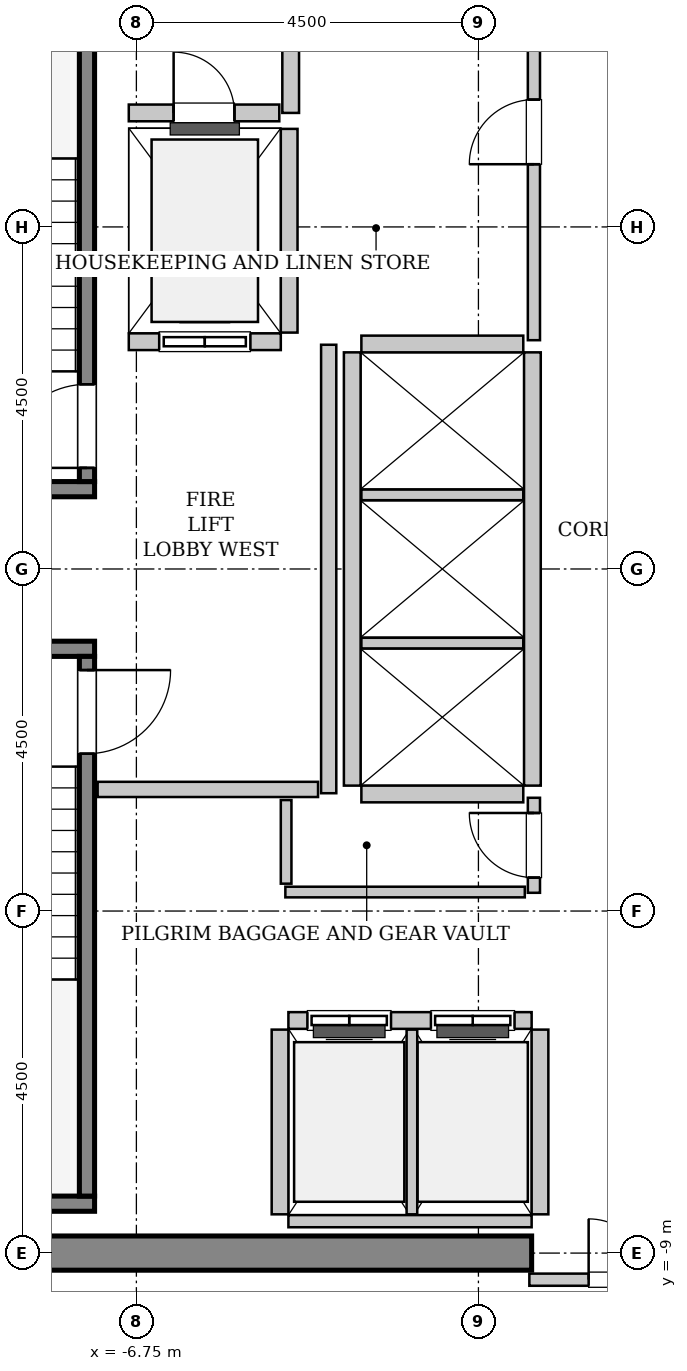
"""IFC4 building model, lengths in metres.
Left out: names, types, materials, properties, quantities, classifications, styles, units other than length and angle.
Written with IfcOpenShell. Run it as: python <this file> out.ifc"""

import sys

from ifc_helpers import new_model, si_unit, direction, frame, frame_2d, origin, place, context, subcontext, project, spatial, rectangle, extrude, source, transform, mapped, element, fill, save


model = new_model("IFC4")
c1 = context("Model", 3, precision=1e-05, world=origin(), true_north=direction((0.0, 1.0)))
c2 = subcontext(c1, "Body", "Model", "MODEL_VIEW")
j1 = project(units=[si_unit("LENGTHUNIT", "METRE"), si_unit("PLANEANGLEUNIT", "RADIAN")], contexts=[c1])
p1 = place(None, origin())
s1 = spatial("IfcSite", under=j1, at=p1, CompositionType="ELEMENT")
p2 = place(p1, origin())
s2 = spatial("IfcBuilding", under=s1, at=p2, CompositionType="ELEMENT")
p3 = place(p2, frame((0.0, 0.0, 244.6)))
s3 = spatial("IfcBuildingStorey", under=s2, at=p3, CompositionType="ELEMENT", Elevation=244.6)
m1 = source(origin(), c2, "Body", "SweptSolid", [
    extrude(rectangle(XDim=9.925, YDim=0.45, at=frame_2d((4.962, 0.0))), origin(), (0.0, 0.0, 1.0), 3.8),
])
p4 = place(p3, frame((-11.475, -9.0, 0.0), z_axis=(0.0, 0.0, 1.0), x_axis=(1.0, 0.0, 0.0)))
e1 = element("IfcWall", 1, at=p4, inside=s3, PredefinedType="SHEAR", context=c2, shape_type="MappedRepresentation", body=[
    mapped(m1, transform((0.0, 0.0, 0.0), x_axis=(1.0, 0.0, 0.0), y_axis=(0.0, 1.0, 0.0), z_axis=(0.0, 0.0, 1.0), scale=1.0)),
])
m2 = source(origin(), c2, "Body", "SweptSolid", [
    extrude(rectangle(XDim=3.4, YDim=0.2, at=frame_2d((1.7, 0.0))), origin(), (0.0, 0.0, 1.0), 3.8),
])
p5 = place(p3, frame((-7.3, 1.05, 0.0), z_axis=(0.0, 0.0, 1.0), x_axis=(-1.0, 0.0, 0.0)))
e2 = element("IfcWall", 2, at=p5, inside=s3, PredefinedType="SOLIDWALL", context=c2, shape_type="MappedRepresentation", body=[
    mapped(m2, transform((0.0, 0.0, 0.0), x_axis=(1.0, 0.0, 0.0), y_axis=(0.0, 1.0, 0.0), z_axis=(0.0, 0.0, 1.0), scale=1.0)),
])
m3 = source(origin(), c2, "Body", "SweptSolid", [
    extrude(rectangle(XDim=7.1, YDim=0.2, at=frame_2d((3.55, 0.0))), origin(), (0.0, 0.0, 1.0), 3.8),
])
p6 = place(p3, frame((-7.4, 1.15, 0.0), z_axis=(0.0, 0.0, 1.0), x_axis=(0.0, 1.0, 0.0)))
e3 = element("IfcWall", 3, at=p6, inside=s3, PredefinedType="SOLIDWALL", context=c2, shape_type="MappedRepresentation", body=[
    mapped(m3, transform((0.0, 0.0, 0.0), x_axis=(1.0, 0.0, 0.0), y_axis=(0.0, 1.0, 0.0), z_axis=(0.0, 0.0, 1.0), scale=1.0)),
])
p7 = place(p6, frame((0.18, 0.0, 0.0)))
e4 = element("IfcOpeningElement", 4, at=p7, cuts=e3, PredefinedType="OPENING", context=c2, shape_type="SweptSolid", body=[
    extrude(rectangle(XDim=1.1, YDim=2.15, at=frame_2d((0.55, 1.075))), frame((0.0, 0.11, 0.0), z_axis=(0.0, -1.0, 0.0), x_axis=(1.0, 0.0, 0.0)), (0.0, 0.0, 1.0), 0.22),
])
p8 = place(p3, frame((-10.7, -1.05, 0.0), z_axis=(0.0, 0.0, 1.0), x_axis=(1.0, 0.0, 0.0)))
e5 = element("IfcWall", 5, at=p8, inside=s3, PredefinedType="SOLIDWALL", context=c2, shape_type="MappedRepresentation", body=[
    mapped(m2, transform((0.0, 0.0, 0.0), x_axis=(1.0, 0.0, 0.0), y_axis=(0.0, 1.0, 0.0), z_axis=(0.0, 0.0, 1.0), scale=1.0)),
])
m4 = source(origin(), c2, "Body", "SweptSolid", [
    extrude(rectangle(XDim=3.73, YDim=0.2, at=frame_2d((1.865, 0.0))), origin(), (0.0, 0.0, 1.0), 3.8),
])
p9 = place(p3, frame((-11.03, -8.35, 0.0), z_axis=(0.0, 0.0, 1.0), x_axis=(1.0, 0.0, 0.0)))
e6 = element("IfcWall", 6, at=p9, inside=s3, PredefinedType="SOLIDWALL", context=c2, shape_type="MappedRepresentation", body=[
    mapped(m4, transform((0.0, 0.0, 0.0), x_axis=(1.0, 0.0, 0.0), y_axis=(0.0, 1.0, 0.0), z_axis=(0.0, 0.0, 1.0), scale=1.0)),
])
p10 = place(p3, frame((-7.4, -1.15, 0.0), z_axis=(0.0, 0.0, 1.0), x_axis=(0.0, -1.0, 0.0)))
e7 = element("IfcWall", 7, at=p10, inside=s3, PredefinedType="SOLIDWALL", context=c2, shape_type="MappedRepresentation", body=[
    mapped(m3, transform((0.0, 0.0, 0.0), x_axis=(1.0, 0.0, 0.0), y_axis=(0.0, 1.0, 0.0), z_axis=(0.0, 0.0, 1.0), scale=1.0)),
])
p11 = place(p10, frame((0.18, 0.0, 0.0)))
e8 = element("IfcOpeningElement", 8, at=p11, cuts=e7, PredefinedType="OPENING", context=c2, shape_type="SweptSolid", body=[
    extrude(rectangle(XDim=1.1, YDim=2.15, at=frame_2d((0.55, 1.075))), frame((0.0, 0.11, 0.0), z_axis=(0.0, -1.0, 0.0), x_axis=(1.0, 0.0, 0.0)), (0.0, 0.0, 1.0), 0.22),
])
m5 = source(origin(), c2, "Body", "SweptSolid", [
    extrude(rectangle(XDim=2.0, YDim=0.22, at=frame_2d((1.0, 0.0))), origin(), (0.0, 0.0, 1.0), 3.535),
])
p12 = place(p3, frame((-6.85, 2.99, 0.0), z_axis=(0.0, 0.0, 1.0), x_axis=(1.0, 0.0, 0.0)))
e9 = element("IfcWall", 9, at=p12, inside=s3, PredefinedType="SOLIDWALL", context=c2, shape_type="MappedRepresentation", body=[
    mapped(m5, transform((0.0, 0.0, 0.0), x_axis=(1.0, 0.0, 0.0), y_axis=(0.0, 1.0, 0.0), z_axis=(0.0, 0.0, 1.0), scale=1.0)),
])
p13 = place(p12, frame((0.4, 0.0, 0.0)))
e10 = element("IfcOpeningElement", 10, at=p13, cuts=e9, PredefinedType="OPENING", context=c2, shape_type="SweptSolid", body=[
    extrude(rectangle(XDim=1.2, YDim=2.2, at=frame_2d((0.6, 1.1))), frame((0.0, 0.12, 0.0), z_axis=(0.0, -1.0, 0.0), x_axis=(1.0, 0.0, 0.0)), (0.0, 0.0, 1.0), 0.24),
])
m6 = source(origin(), c2, "Body", "SweptSolid", [
    extrude(rectangle(XDim=2.68, YDim=0.22, at=frame_2d((1.34, 0.0))), origin(), (0.0, 0.0, 1.0), 3.535),
])
p14 = place(p3, frame((-4.74, 3.11, 0.0), z_axis=(0.0, 0.0, 1.0), x_axis=(0.0, 1.0, 0.0)))
e11 = element("IfcWall", 11, at=p14, inside=s3, PredefinedType="SOLIDWALL", context=c2, shape_type="MappedRepresentation", body=[
    mapped(m6, transform((0.0, 0.0, 0.0), x_axis=(1.0, 0.0, 0.0), y_axis=(0.0, 1.0, 0.0), z_axis=(0.0, 0.0, 1.0), scale=1.0)),
])
m7 = source(origin(), c2, "Body", "SweptSolid", [
    extrude(rectangle(XDim=3.2, YDim=0.22, at=frame_2d((1.6, 0.0))), origin(), (0.0, 0.0, 1.0), 3.535),
])
p15 = place(p3, frame((-1.55, -5.94, 0.0), z_axis=(0.0, 0.0, 1.0), x_axis=(-1.0, 0.0, 0.0)))
e12 = element("IfcWall", 12, at=p15, inside=s3, PredefinedType="SOLIDWALL", context=c2, shape_type="MappedRepresentation", body=[
    mapped(m7, transform((0.0, 0.0, 0.0), x_axis=(1.0, 0.0, 0.0), y_axis=(0.0, 1.0, 0.0), z_axis=(0.0, 0.0, 1.0), scale=1.0)),
])
p16 = place(p15, frame((1.85, 0.0, 0.0)))
e13 = element("IfcOpeningElement", 13, at=p16, cuts=e12, PredefinedType="OPENING", context=c2, shape_type="SweptSolid", body=[
    extrude(rectangle(XDim=1.1, YDim=2.2, at=frame_2d((0.55, 1.1))), frame((0.0, 0.12, 0.0), z_axis=(0.0, -1.0, 0.0), x_axis=(1.0, 0.0, 0.0)), (0.0, 0.0, 1.0), 0.24),
])
p17 = place(p15, frame((0.225, 0.0, 0.0)))
e14 = element("IfcOpeningElement", 14, at=p17, cuts=e12, PredefinedType="OPENING", context=c2, shape_type="SweptSolid", body=[
    extrude(rectangle(XDim=1.1, YDim=2.2, at=frame_2d((0.55, 1.1))), frame((0.0, 0.12, 0.0), z_axis=(0.0, -1.0, 0.0), x_axis=(1.0, 0.0, 0.0)), (0.0, 0.0, 1.0), 0.24),
])
m8 = source(origin(), c2, "Body", "SweptSolid", [
    extrude(rectangle(XDim=3.2, YDim=0.16, at=frame_2d((1.6, 0.0))), origin(), (0.0, 0.0, 1.0), 2.625),
])
p18 = place(p3, frame((-4.75, -8.58, 0.0), z_axis=(0.0, 0.0, 1.0), x_axis=(1.0, 0.0, 0.0)))
e15 = element("IfcWall", 15, at=p18, inside=s3, PredefinedType="PARTITIONING", context=c2, shape_type="MappedRepresentation", body=[
    mapped(m8, transform((0.0, 0.0, 0.0), x_axis=(1.0, 0.0, 0.0), y_axis=(0.0, 1.0, 0.0), z_axis=(0.0, 0.0, 1.0), scale=1.0)),
])
m9 = source(origin(), c2, "Body", "SweptSolid", [
    extrude(rectangle(XDim=2.43, YDim=0.22, at=frame_2d((1.215, 0.0))), origin(), (0.0, 0.0, 1.0), 3.535),
])
p19 = place(p3, frame((-4.86, -6.06, 0.0), z_axis=(0.0, 0.0, 1.0), x_axis=(0.0, -1.0, 0.0)))
e16 = element("IfcWall", 16, at=p19, inside=s3, PredefinedType="SOLIDWALL", context=c2, shape_type="MappedRepresentation", body=[
    mapped(m9, transform((0.0, 0.0, 0.0), x_axis=(1.0, 0.0, 0.0), y_axis=(0.0, 1.0, 0.0), z_axis=(0.0, 0.0, 1.0), scale=1.0)),
])
m10 = source(origin(), c2, "Body", "SweptSolid", [
    extrude(rectangle(XDim=2.43, YDim=0.14, at=frame_2d((1.215, 0.0))), origin(), (0.0, 0.0, 1.0), 3.535),
])
p20 = place(p3, frame((-3.125, -8.49, 0.0), z_axis=(0.0, 0.0, 1.0), x_axis=(0.0, 1.0, 0.0)))
e17 = element("IfcWall", 17, at=p20, inside=s3, PredefinedType="PARTITIONING", context=c2, shape_type="MappedRepresentation", body=[
    mapped(m10, transform((0.0, 0.0, 0.0), x_axis=(1.0, 0.0, 0.0), y_axis=(0.0, 1.0, 0.0), z_axis=(0.0, 0.0, 1.0), scale=1.0)),
])
p21 = place(p3, frame((-1.44, -8.49, 0.0), z_axis=(0.0, 0.0, 1.0), x_axis=(0.0, 1.0, 0.0)))
e18 = element("IfcWall", 18, at=p21, inside=s3, PredefinedType="SOLIDWALL", context=c2, shape_type="MappedRepresentation", body=[
    mapped(m9, transform((0.0, 0.0, 0.0), x_axis=(1.0, 0.0, 0.0), y_axis=(0.0, 1.0, 0.0), z_axis=(0.0, 0.0, 1.0), scale=1.0)),
])
m11 = source(origin(), c2, "Body", "SweptSolid", [
    extrude(rectangle(XDim=5.7, YDim=0.22, at=frame_2d((2.85, 0.0))), origin(), (0.0, 0.0, 1.0), 3.535),
])
for number, where, z_axis, x_axis in (
    (19, (-1.54, -2.85, 0.0), (0.0, 0.0, 1.0), (0.0, 1.0, 0.0)),
    (20, (-3.91, 2.85, 0.0), (0.0, 0.0, 1.0), (0.0, -1.0, 0.0)),
):
    element("IfcWall", number, at=place(p3, frame(where, z_axis=z_axis, x_axis=x_axis)), inside=s3, PredefinedType="SOLIDWALL", context=c2, shape_type="MappedRepresentation", body=[
        mapped(m11, transform((0.0, 0.0, 0.0), x_axis=(1.0, 0.0, 0.0), y_axis=(0.0, 1.0, 0.0), z_axis=(0.0, 0.0, 1.0), scale=1.0)),
    ])
m12 = source(origin(), c2, "Body", "SweptSolid", [
    extrude(rectangle(XDim=2.13, YDim=0.22, at=frame_2d((1.065, 0.0))), origin(), (0.0, 0.0, 1.0), 3.535),
])
p22 = place(p3, frame((-3.79, -2.96, 0.0), z_axis=(0.0, 0.0, 1.0), x_axis=(1.0, 0.0, 0.0)))
e21 = element("IfcWall", 21, at=p22, inside=s3, PredefinedType="SOLIDWALL", context=c2, shape_type="MappedRepresentation", body=[
    mapped(m12, transform((0.0, 0.0, 0.0), x_axis=(1.0, 0.0, 0.0), y_axis=(0.0, 1.0, 0.0), z_axis=(0.0, 0.0, 1.0), scale=1.0)),
])
m13 = source(origin(), c2, "Body", "SweptSolid", [
    extrude(rectangle(XDim=2.13, YDim=0.14, at=frame_2d((1.065, 0.0))), origin(), (0.0, 0.0, 1.0), 3.535),
])
for number, where, z_axis, x_axis in (
    (22, (-3.79, -0.975, 0.0), (0.0, 0.0, 1.0), (1.0, 0.0, 0.0)),
    (23, (-3.79, 0.975, 0.0), (0.0, 0.0, 1.0), (1.0, 0.0, 0.0)),
):
    element("IfcWall", number, at=place(p3, frame(where, z_axis=z_axis, x_axis=x_axis)), inside=s3, PredefinedType="PARTITIONING", context=c2, shape_type="MappedRepresentation", body=[
        mapped(m13, transform((0.0, 0.0, 0.0), x_axis=(1.0, 0.0, 0.0), y_axis=(0.0, 1.0, 0.0), z_axis=(0.0, 0.0, 1.0), scale=1.0)),
    ])
p23 = place(p3, frame((-1.66, 2.96, 0.0), z_axis=(0.0, 0.0, 1.0), x_axis=(-1.0, 0.0, 0.0)))
e24 = element("IfcWall", 24, at=p23, inside=s3, PredefinedType="SOLIDWALL", context=c2, shape_type="MappedRepresentation", body=[
    mapped(m12, transform((0.0, 0.0, 0.0), x_axis=(1.0, 0.0, 0.0), y_axis=(0.0, 1.0, 0.0), z_axis=(0.0, 0.0, 1.0), scale=1.0)),
])
m14 = source(origin(), c2, "Body", "SweptSolid", [
    extrude(rectangle(XDim=2.25, YDim=0.22, at=frame_2d((1.125, 0.0))), origin(), (0.0, 0.0, 1.0), 3.535),
])
p24 = place(p3, frame((-4.72, 6.0, 0.0), z_axis=(0.0, 0.0, 1.0), x_axis=(0.0, 1.0, 0.0)))
e25 = element("IfcWall", 25, at=p24, inside=s3, PredefinedType="SOLIDWALL", context=c2, shape_type="MappedRepresentation", body=[
    mapped(m14, transform((0.0, 0.0, 0.0), x_axis=(1.0, 0.0, 0.0), y_axis=(0.0, 1.0, 0.0), z_axis=(0.0, 0.0, 1.0), scale=1.0)),
])
m15 = source(origin(), c2, "Body", "SweptSolid", [
    extrude(rectangle(XDim=1.98, YDim=0.22, at=frame_2d((0.99, 0.0))), origin(), (0.0, 0.0, 1.0), 3.535),
])
p25 = place(p3, frame((-6.85, 6.0, 0.0), z_axis=(0.0, 0.0, 1.0), x_axis=(1.0, 0.0, 0.0)))
e26 = element("IfcWall", 26, at=p25, inside=s3, PredefinedType="SOLIDWALL", context=c2, shape_type="MappedRepresentation", body=[
    mapped(m15, transform((0.0, 0.0, 0.0), x_axis=(1.0, 0.0, 0.0), y_axis=(0.0, 1.0, 0.0), z_axis=(0.0, 0.0, 1.0), scale=1.0)),
])
p26 = place(p25, frame((0.59, 0.0, 0.0)))
e27 = element("IfcOpeningElement", 27, at=p26, cuts=e26, PredefinedType="OPENING", context=c2, shape_type="SweptSolid", body=[
    extrude(rectangle(XDim=0.8, YDim=2.0, at=frame_2d((0.4, 1.0))), frame((0.0, 0.12, 0.0), z_axis=(0.0, -1.0, 0.0), x_axis=(1.0, 0.0, 0.0)), (0.0, 0.0, 1.0), 0.24),
])
m16 = source(origin(), c2, "Body", "SweptSolid", [
    extrude(rectangle(XDim=5.9, YDim=0.2, at=frame_2d((2.95, 0.0))), origin(), (0.0, 0.0, 1.0), 3.535),
])
p27 = place(p3, frame((-4.22, -2.95, 0.0), z_axis=(0.0, 0.0, 1.0), x_axis=(0.0, 1.0, 0.0)))
e28 = element("IfcWall", 28, at=p27, inside=s3, PredefinedType="PARTITIONING", context=c2, shape_type="MappedRepresentation", body=[
    mapped(m16, transform((0.0, 0.0, 0.0), x_axis=(1.0, 0.0, 0.0), y_axis=(0.0, 1.0, 0.0), z_axis=(0.0, 0.0, 1.0), scale=1.0)),
])
m17 = source(origin(), c2, "Body", "SweptSolid", [
    extrude(rectangle(XDim=2.9, YDim=0.2, at=frame_2d((1.45, 0.0))), origin(), (0.0, 0.0, 1.0), 3.535),
])
p28 = place(p3, frame((-7.26, -2.9, 0.0), z_axis=(0.0, 0.0, 1.0), x_axis=(1.0, 0.0, 0.0)))
e29 = element("IfcWall", 29, at=p28, inside=s3, PredefinedType="PARTITIONING", context=c2, shape_type="MappedRepresentation", body=[
    mapped(m17, transform((0.0, 0.0, 0.0), x_axis=(1.0, 0.0, 0.0), y_axis=(0.0, 1.0, 0.0), z_axis=(0.0, 0.0, 1.0), scale=1.0)),
])
m18 = source(origin(), c2, "Body", "SweptSolid", [
    extrude(rectangle(XDim=3.16, YDim=0.16, at=frame_2d((1.58, 0.0))), origin(), (0.0, 0.0, 1.0), 2.625),
])
p29 = place(p3, frame((-1.58, -9.35, 0.0), z_axis=(0.0, 0.0, 1.0), x_axis=(1.0, 0.0, 0.0)))
e30 = element("IfcWall", 30, at=p29, inside=s3, PredefinedType="PARTITIONING", context=c2, shape_type="MappedRepresentation", body=[
    mapped(m18, transform((0.0, 0.0, 0.0), x_axis=(1.0, 0.0, 0.0), y_axis=(0.0, 1.0, 0.0), z_axis=(0.0, 0.0, 1.0), scale=1.0)),
])
p30 = place(p29, frame((0.78, 0.0, 0.0)))
e31 = element("IfcOpeningElement", 31, at=p30, cuts=e30, PredefinedType="OPENING", context=c2, shape_type="SweptSolid", body=[
    extrude(rectangle(XDim=1.6, YDim=2.3, at=frame_2d((0.8, 1.15))), frame((0.0, 0.09, 0.0), z_axis=(0.0, -1.0, 0.0), x_axis=(1.0, 0.0, 0.0)), (0.0, 0.0, 1.0), 0.18),
])
m19 = source(origin(), c2, "Body", "SweptSolid", [
    extrude(rectangle(XDim=5.48, YDim=0.16, at=frame_2d((2.74, 0.0))), origin(), (0.0, 0.0, 1.0), 3.535),
])
p31 = place(p3, frame((-1.52, 3.01, 0.0), z_axis=(0.0, 0.0, 1.0), x_axis=(0.0, 1.0, 0.0)))
e32 = element("IfcWall", 32, at=p31, inside=s3, PredefinedType="PARTITIONING", context=c2, shape_type="MappedRepresentation", body=[
    mapped(m19, transform((0.0, 0.0, 0.0), x_axis=(1.0, 0.0, 0.0), y_axis=(0.0, 1.0, 0.0), z_axis=(0.0, 0.0, 1.0), scale=1.0)),
])
p32 = place(p31, frame((2.315, 0.0, 0.0)))
e33 = element("IfcOpeningElement", 33, at=p32, cuts=e32, PredefinedType="OPENING", context=c2, shape_type="SweptSolid", body=[
    extrude(rectangle(XDim=0.85, YDim=2.1, at=frame_2d((0.425, 1.05))), frame((0.0, 0.09, 0.0), z_axis=(0.0, -1.0, 0.0), x_axis=(1.0, 0.0, 0.0)), (0.0, 0.0, 1.0), 0.18),
])
m20 = source(origin(), c2, "Body", "SweptSolid", [
    extrude(rectangle(XDim=1.25, YDim=0.16, at=frame_2d((0.625, 0.0))), origin(), (0.0, 0.0, 1.0), 3.535),
])
p33 = place(p3, frame((-1.52, -4.26, 0.0), z_axis=(0.0, 0.0, 1.0), x_axis=(0.0, 1.0, 0.0)))
e34 = element("IfcWall", 34, at=p33, inside=s3, PredefinedType="PARTITIONING", context=c2, shape_type="MappedRepresentation", body=[
    mapped(m20, transform((0.0, 0.0, 0.0), x_axis=(1.0, 0.0, 0.0), y_axis=(0.0, 1.0, 0.0), z_axis=(0.0, 0.0, 1.0), scale=1.0)),
])
p34 = place(p33, frame((0.2, 0.0, 0.0)))
e35 = element("IfcOpeningElement", 35, at=p34, cuts=e34, PredefinedType="OPENING", context=c2, shape_type="SweptSolid", body=[
    extrude(rectangle(XDim=0.85, YDim=2.1, at=frame_2d((0.425, 1.05))), frame((0.0, 0.09, 0.0), z_axis=(0.0, -1.0, 0.0), x_axis=(1.0, 0.0, 0.0)), (0.0, 0.0, 1.0), 0.18),
])
m21 = source(origin(), c2, "Body", "SweptSolid", [
    extrude(rectangle(XDim=3.15, YDim=0.14, at=frame_2d((1.575, 0.0))), origin(), (0.0, 0.0, 1.0), 3.535),
])
p35 = place(p3, frame((-4.79, -4.25, 0.0), z_axis=(0.0, 0.0, 1.0), x_axis=(1.0, 0.0, 0.0)))
e36 = element("IfcWall", 36, at=p35, inside=s3, PredefinedType="PARTITIONING", context=c2, shape_type="MappedRepresentation", body=[
    mapped(m21, transform((0.0, 0.0, 0.0), x_axis=(1.0, 0.0, 0.0), y_axis=(0.0, 1.0, 0.0), z_axis=(0.0, 0.0, 1.0), scale=1.0)),
])
m22 = source(origin(), c2, "Body", "SweptSolid", [
    extrude(rectangle(XDim=1.1, YDim=0.14, at=frame_2d((0.55, 0.0))), origin(), (0.0, 0.0, 1.0), 3.535),
])
p36 = place(p3, frame((-4.78, -4.14, 0.0), z_axis=(0.0, 0.0, 1.0), x_axis=(0.0, 1.0, 0.0)))
e37 = element("IfcWall", 37, at=p36, inside=s3, PredefinedType="PARTITIONING", context=c2, shape_type="MappedRepresentation", body=[
    mapped(m22, transform((0.0, 0.0, 0.0), x_axis=(1.0, 0.0, 0.0), y_axis=(0.0, 1.0, 0.0), z_axis=(0.0, 0.0, 1.0), scale=1.0)),
])
m23 = source(origin(), c2, "Body", "SweptSolid", [
    extrude(rectangle(XDim=1.1, YDim=2.15, at=frame_2d((0.55, 1.075))), frame((0.0, 0.025, 0.0), z_axis=(0.0, -1.0, 0.0), x_axis=(1.0, 0.0, 0.0)), (0.0, 0.0, 1.0), 0.05),
])
p37 = place(p7, origin())
e38 = element("IfcDoor", 38, at=p37, inside=s3, OperationType="SINGLE_SWING_LEFT", PredefinedType="DOOR", context=c2, shape_type="MappedRepresentation", body=[
    mapped(m23, transform((0.0, 0.0, 0.0), x_axis=(1.0, 0.0, 0.0), y_axis=(0.0, 1.0, 0.0), z_axis=(0.0, 0.0, 1.0), scale=1.0)),
])
fill(e4, e38)
p38 = place(p11, origin())
e39 = element("IfcDoor", 39, at=p38, inside=s3, OperationType="SINGLE_SWING_LEFT", PredefinedType="DOOR", context=c2, shape_type="MappedRepresentation", body=[
    mapped(m23, transform((0.0, 0.0, 0.0), x_axis=(1.0, 0.0, 0.0), y_axis=(0.0, 1.0, 0.0), z_axis=(0.0, 0.0, 1.0), scale=1.0)),
])
fill(e8, e39)
m24 = source(origin(), c2, "Body", "SweptSolid", [
    extrude(rectangle(XDim=1.2, YDim=2.2, at=frame_2d((0.6, 1.1))), frame((0.0, 0.025, 0.0), z_axis=(0.0, -1.0, 0.0), x_axis=(1.0, 0.0, 0.0)), (0.0, 0.0, 1.0), 0.05),
])
p39 = place(p13, origin())
e40 = element("IfcDoor", 40, at=p39, inside=s3, OperationType="SLIDING_TO_LEFT", PredefinedType="DOOR", context=c2, shape_type="MappedRepresentation", body=[
    mapped(m24, transform((0.0, 0.0, 0.0), x_axis=(1.0, 0.0, 0.0), y_axis=(0.0, 1.0, 0.0), z_axis=(0.0, 0.0, 1.0), scale=1.0)),
])
fill(e10, e40)
m25 = source(origin(), c2, "Body", "SweptSolid", [
    extrude(rectangle(XDim=1.1, YDim=2.2, at=frame_2d((0.55, 1.1))), frame((0.0, 0.025, 0.0), z_axis=(0.0, -1.0, 0.0), x_axis=(1.0, 0.0, 0.0)), (0.0, 0.0, 1.0), 0.05),
])
p40 = place(p16, origin())
e41 = element("IfcDoor", 41, at=p40, inside=s3, OperationType="DOUBLE_DOOR_SLIDING", PredefinedType="DOOR", context=c2, shape_type="MappedRepresentation", body=[
    mapped(m25, transform((0.0, 0.0, 0.0), x_axis=(1.0, 0.0, 0.0), y_axis=(0.0, 1.0, 0.0), z_axis=(0.0, 0.0, 1.0), scale=1.0)),
])
fill(e13, e41)
p41 = place(p17, origin())
e42 = element("IfcDoor", 42, at=p41, inside=s3, OperationType="DOUBLE_DOOR_SLIDING", PredefinedType="DOOR", context=c2, shape_type="MappedRepresentation", body=[
    mapped(m25, transform((0.0, 0.0, 0.0), x_axis=(1.0, 0.0, 0.0), y_axis=(0.0, 1.0, 0.0), z_axis=(0.0, 0.0, 1.0), scale=1.0)),
])
fill(e14, e42)
m26 = source(origin(), c2, "Body", "SweptSolid", [
    extrude(rectangle(XDim=0.8, YDim=2.0, at=frame_2d((0.4, 1.0))), frame((0.0, 0.025, 0.0), z_axis=(0.0, -1.0, 0.0), x_axis=(1.0, 0.0, 0.0)), (0.0, 0.0, 1.0), 0.05),
])
p42 = place(p26, origin())
e43 = element("IfcDoor", 43, at=p42, inside=s3, OperationType="SINGLE_SWING_LEFT", PredefinedType="TRAPDOOR", context=c2, shape_type="MappedRepresentation", body=[
    mapped(m26, transform((0.0, 0.0, 0.0), x_axis=(1.0, 0.0, 0.0), y_axis=(0.0, 1.0, 0.0), z_axis=(0.0, 0.0, 1.0), scale=1.0)),
])
fill(e27, e43)
m27 = source(origin(), c2, "Body", "SweptSolid", [
    extrude(rectangle(XDim=1.6, YDim=2.3, at=frame_2d((0.8, 1.15))), frame((0.0, 0.025, 0.0), z_axis=(0.0, -1.0, 0.0), x_axis=(1.0, 0.0, 0.0)), (0.0, 0.0, 1.0), 0.05),
])
p43 = place(p30, origin())
e44 = element("IfcDoor", 44, at=p43, inside=s3, OperationType="DOUBLE_DOOR_SINGLE_SWING", PredefinedType="DOOR", context=c2, shape_type="MappedRepresentation", body=[
    mapped(m27, transform((0.0, 0.0, 0.0), x_axis=(1.0, 0.0, 0.0), y_axis=(0.0, 1.0, 0.0), z_axis=(0.0, 0.0, 1.0), scale=1.0)),
])
fill(e31, e44)
m28 = source(origin(), c2, "Body", "SweptSolid", [
    extrude(rectangle(XDim=0.85, YDim=2.1, at=frame_2d((0.425, 1.05))), frame((0.0, 0.025, 0.0), z_axis=(0.0, -1.0, 0.0), x_axis=(1.0, 0.0, 0.0)), (0.0, 0.0, 1.0), 0.05),
])
p44 = place(p32, origin())
e45 = element("IfcDoor", 45, at=p44, inside=s3, OperationType="SINGLE_SWING_LEFT", PredefinedType="DOOR", context=c2, shape_type="MappedRepresentation", body=[
    mapped(m28, transform((0.0, 0.0, 0.0), x_axis=(1.0, 0.0, 0.0), y_axis=(0.0, 1.0, 0.0), z_axis=(0.0, 0.0, 1.0), scale=1.0)),
])
fill(e33, e45)
p45 = place(p34, origin())
e46 = element("IfcDoor", 46, at=p45, inside=s3, OperationType="SINGLE_SWING_RIGHT", PredefinedType="DOOR", context=c2, shape_type="MappedRepresentation", body=[
    mapped(m28, transform((0.0, 0.0, 0.0), x_axis=(1.0, 0.0, 0.0), y_axis=(0.0, 1.0, 0.0), z_axis=(0.0, 0.0, 1.0), scale=1.0)),
])
fill(e35, e46)
save(model, sys.argv[1])
